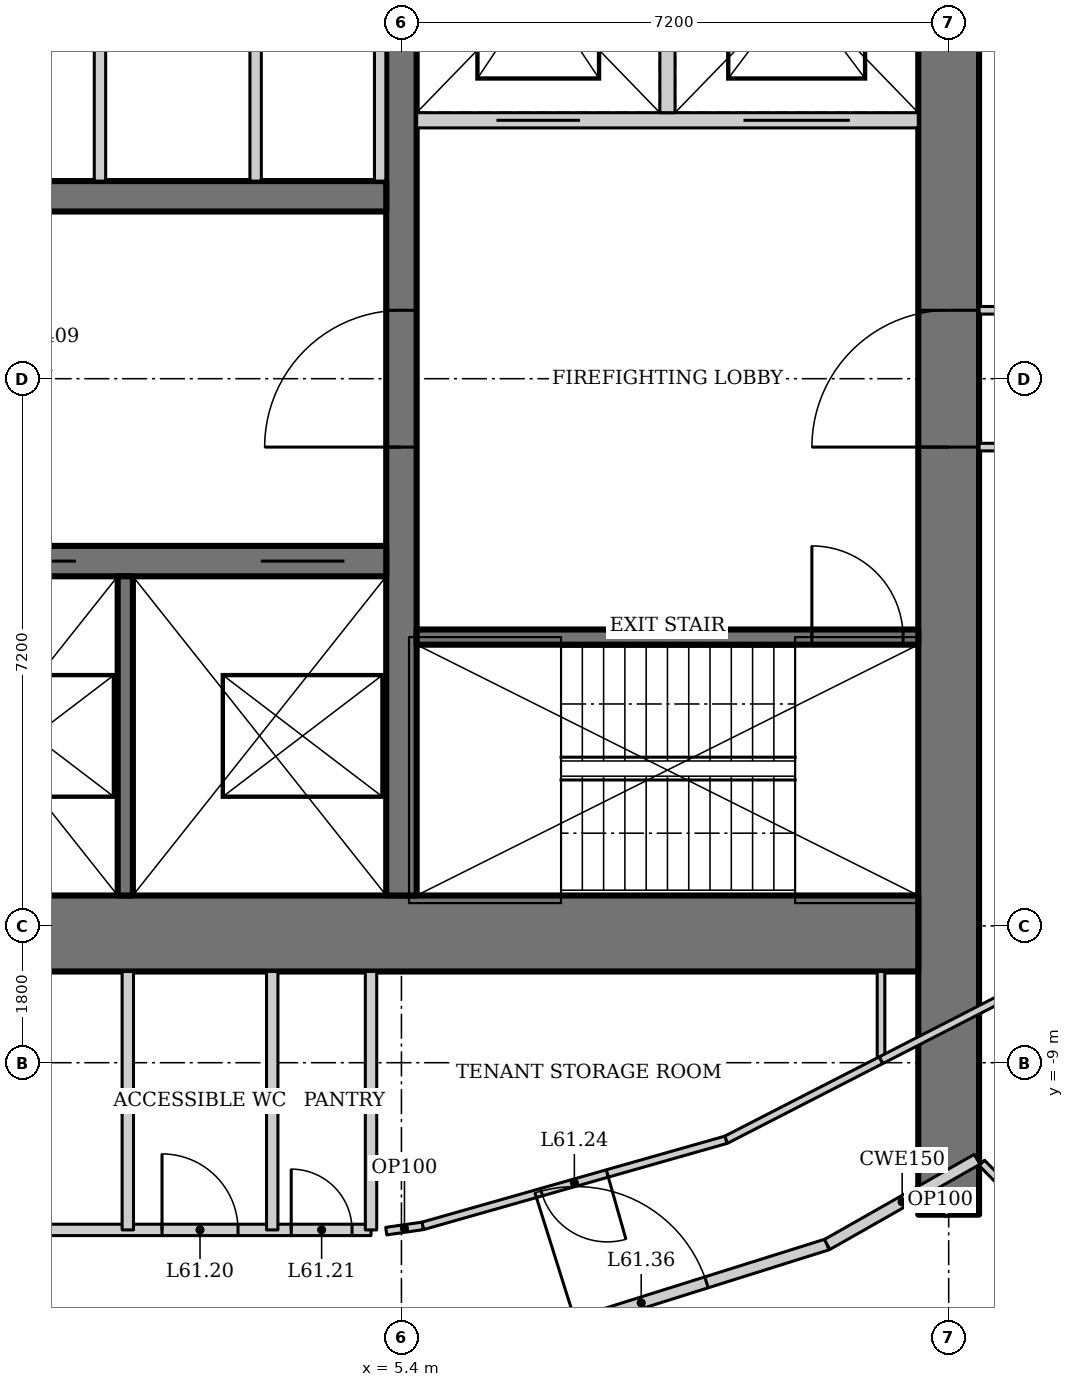
"""IFC4 building model, lengths in metres.
Left out: names, types, materials, properties, quantities, classifications, styles, units other than length and angle.
Written with IfcOpenShell. Run it as: python <this file> out.ifc"""

import sys

from ifc_helpers import new_model, si_unit, direction, frame, frame_2d, origin, place, context, subcontext, project, spatial, rectangle, extrude, element, fill, save


model = new_model("IFC4")
c1 = context("Model", 3, precision=1e-05, world=origin(), true_north=direction((0.0, 1.0)))
c2 = subcontext(c1, "Body", "Model", "MODEL_VIEW")
j1 = project(units=[si_unit("LENGTHUNIT", "METRE"), si_unit("PLANEANGLEUNIT", "RADIAN")], contexts=[c1])
p1 = place(None, origin())
s1 = spatial("IfcSite", under=j1, at=p1, CompositionType="ELEMENT")
p2 = place(p1, origin())
s2 = spatial("IfcBuilding", under=s1, at=p2, CompositionType="ELEMENT")
p3 = place(p2, frame((0.0, 0.0, 262.0)))
s3 = spatial("IfcBuildingStorey", under=s2, at=p3, CompositionType="ELEMENT", Elevation=262.0)
p4 = place(p3, frame((12.6, -11.0, 0.0), z_axis=(0.0, 0.0, 1.0), x_axis=(0.0, 1.0, 0.0)))
e1 = element("IfcWall", 1, at=p4, inside=s3, PredefinedType="SHEAR", context=c2, shape_type="SweptSolid", body=[
    extrude(rectangle(XDim=22.0, YDim=0.8, at=frame_2d((11.0, 0.0))), origin(), (0.0, 0.0, 1.0), 4.2),
])
p5 = place(p4, frame((10.1, 0.0, 0.0)))
e2 = element("IfcOpeningElement", 2, at=p5, cuts=e1, PredefinedType="OPENING", context=c2, shape_type="SweptSolid", body=[
    extrude(rectangle(XDim=1.8, YDim=2.1, at=frame_2d((0.9, 1.05))), frame((0.0, 0.41, 0.0), z_axis=(0.0, -1.0, 0.0), x_axis=(1.0, 0.0, 0.0)), (0.0, 0.0, 1.0), 0.82),
])
p6 = place(p3, frame((-12.2, -7.3, 0.0), z_axis=(0.0, 0.0, 1.0), x_axis=(1.0, 0.0, 0.0)))
e3 = element("IfcWall", 3, at=p6, inside=s3, PredefinedType="SHEAR", context=c2, shape_type="SweptSolid", body=[
    extrude(rectangle(XDim=24.4, YDim=1.0, at=frame_2d((12.2, 0.0))), origin(), (0.0, 0.0, 1.0), 4.2),
])
p7 = place(p3, frame((5.4, -6.8, 0.0), z_axis=(0.0, 0.0, 1.0), x_axis=(0.0, 1.0, 0.0)))
e4 = element("IfcWall", 4, at=p7, inside=s3, PredefinedType="SHEAR", context=c2, shape_type="SweptSolid", body=[
    extrude(rectangle(XDim=14.6, YDim=0.4, at=frame_2d((7.3, 0.0))), origin(), (0.0, 0.0, 1.0), 4.2),
])
p8 = place(p7, frame((5.9, 0.0, 0.0)))
e5 = element("IfcOpeningElement", 5, at=p8, cuts=e4, PredefinedType="OPENING", context=c2, shape_type="SweptSolid", body=[
    extrude(rectangle(XDim=1.8, YDim=2.1, at=frame_2d((0.9, 1.05))), frame((0.0, 0.21, 0.0), z_axis=(0.0, -1.0, 0.0), x_axis=(1.0, 0.0, 0.0)), (0.0, 0.0, 1.0), 0.42),
])
p9 = place(p3, frame((-5.2, -2.4, 0.0), z_axis=(0.0, 0.0, 1.0), x_axis=(1.0, 0.0, 0.0)))
e6 = element("IfcWall", 6, at=p9, inside=s3, PredefinedType="SHEAR", context=c2, shape_type="SweptSolid", body=[
    extrude(rectangle(XDim=10.4, YDim=0.4, at=frame_2d((5.2, 0.0))), origin(), (0.0, 0.0, 1.0), 4.2),
])
p10 = place(p9, frame((1.683, 0.0, 0.0)))
e7 = element("IfcOpeningElement", 7, at=p10, cuts=e6, PredefinedType="OPENING", context=c2, shape_type="SweptSolid", body=[
    extrude(rectangle(XDim=1.1, YDim=2.2, at=frame_2d((0.55, 1.1))), frame((0.0, 0.21, 0.0), z_axis=(0.0, -1.0, 0.0), x_axis=(1.0, 0.0, 0.0)), (0.0, 0.0, 1.0), 0.42),
])
p11 = place(p9, frame((5.217, 0.0, 0.0)))
e8 = element("IfcOpeningElement", 8, at=p11, cuts=e6, PredefinedType="OPENING", context=c2, shape_type="SweptSolid", body=[
    extrude(rectangle(XDim=1.1, YDim=2.2, at=frame_2d((0.55, 1.1))), frame((0.0, 0.21, 0.0), z_axis=(0.0, -1.0, 0.0), x_axis=(1.0, 0.0, 0.0)), (0.0, 0.0, 1.0), 0.42),
])
p12 = place(p9, frame((8.75, 0.0, 0.0)))
e9 = element("IfcOpeningElement", 9, at=p12, cuts=e6, PredefinedType="OPENING", context=c2, shape_type="SweptSolid", body=[
    extrude(rectangle(XDim=1.1, YDim=2.2, at=frame_2d((0.55, 1.1))), frame((0.0, 0.21, 0.0), z_axis=(0.0, -1.0, 0.0), x_axis=(1.0, 0.0, 0.0)), (0.0, 0.0, 1.0), 0.42),
])
p13 = place(p3, frame((1.767, -2.6, 0.0), z_axis=(0.0, 0.0, 1.0), x_axis=(0.0, -1.0, 0.0)))
e10 = element("IfcWall", 10, at=p13, inside=s3, PredefinedType="SOLIDWALL", context=c2, shape_type="SweptSolid", body=[
    extrude(rectangle(XDim=4.2, YDim=0.2, at=frame_2d((2.1, 0.0))), origin(), (0.0, 0.0, 1.0), 4.2),
])
p14 = place(p3, frame((5.2, 2.4, 0.0), z_axis=(0.0, 0.0, 1.0), x_axis=(-1.0, 0.0, 0.0)))
e11 = element("IfcWall", 11, at=p14, inside=s3, PredefinedType="SHEAR", context=c2, shape_type="SweptSolid", body=[
    extrude(rectangle(XDim=10.4, YDim=0.4, at=frame_2d((5.2, 0.0))), origin(), (0.0, 0.0, 1.0), 4.2),
])
p15 = place(p3, frame((5.6, -3.4, 0.0), z_axis=(0.0, 0.0, 1.0), x_axis=(1.0, 0.0, 0.0)))
e12 = element("IfcWall", 12, at=p15, inside=s3, PredefinedType="SHEAR", context=c2, shape_type="SweptSolid", body=[
    extrude(rectangle(XDim=6.6, YDim=0.2, at=frame_2d((3.3, 0.0))), origin(), (0.0, 0.0, 1.0), 4.2),
])
p16 = place(p15, frame((5.2, 0.0, 0.0)))
e13 = element("IfcOpeningElement", 13, at=p16, cuts=e12, PredefinedType="OPENING", context=c2, shape_type="SweptSolid", body=[
    extrude(rectangle(XDim=1.2, YDim=2.1, at=frame_2d((0.6, 1.05))), frame((0.0, 0.11, 0.0), z_axis=(0.0, -1.0, 0.0), x_axis=(1.0, 0.0, 0.0)), (0.0, 0.0, 1.0), 0.22),
])
p17 = place(p3, frame((12.2, 3.4, 0.0), z_axis=(0.0, 0.0, 1.0), x_axis=(-1.0, 0.0, 0.0)))
e14 = element("IfcWall", 14, at=p17, inside=s3, PredefinedType="SOLIDWALL", context=c2, shape_type="SweptSolid", body=[
    extrude(rectangle(XDim=6.6, YDim=0.2, at=frame_2d((3.3, 0.0))), origin(), (0.0, 0.0, 1.0), 4.2),
])
p18 = place(p17, frame((4.45, 0.0, 0.0)))
e15 = element("IfcOpeningElement", 15, at=p18, cuts=e14, PredefinedType="OPENING", context=c2, shape_type="SweptSolid", body=[
    extrude(rectangle(XDim=1.1, YDim=2.2, at=frame_2d((0.55, 1.1))), frame((0.0, 0.11, 0.0), z_axis=(0.0, -1.0, 0.0), x_axis=(1.0, 0.0, 0.0)), (0.0, 0.0, 1.0), 0.22),
])
p19 = place(p17, frame((0.9, 0.0, 0.0)))
e16 = element("IfcOpeningElement", 16, at=p19, cuts=e14, PredefinedType="OPENING", context=c2, shape_type="SweptSolid", body=[
    extrude(rectangle(XDim=1.4, YDim=2.2, at=frame_2d((0.7, 1.1))), frame((0.0, 0.11, 0.0), z_axis=(0.0, -1.0, 0.0), x_axis=(1.0, 0.0, 0.0)), (0.0, 0.0, 1.0), 0.22),
])
p20 = place(p3, frame((8.9, 3.5, 0.0), z_axis=(0.0, 0.0, 1.0), x_axis=(0.0, 1.0, 0.0)))
e17 = element("IfcWall", 17, at=p20, inside=s3, PredefinedType="SOLIDWALL", context=c2, shape_type="SweptSolid", body=[
    extrude(rectangle(XDim=3.3, YDim=0.2, at=frame_2d((1.65, 0.0))), origin(), (0.0, 0.0, 1.0), 4.2),
])
p21 = place(p3, frame((6.521, -12.799, 0.0), z_axis=(0.0, 0.0, 1.0), x_axis=(0.954031103669, 0.299707612903, 0.0)))
e18 = element("IfcWall", 18, at=p21, inside=s3, PredefinedType="PARTITIONING", context=c2, shape_type="SweptSolid", body=[
    extrude(rectangle(XDim=4.695, YDim=0.15, at=frame_2d((2.348, 0.0))), origin(), (0.0, 0.0, 1.0), 4.05),
])
p22 = place(p21, frame((1.231, 0.0, 0.0)))
e19 = element("IfcOpeningElement", 19, at=p22, cuts=e18, PredefinedType="OPENING", context=c2, shape_type="SweptSolid", body=[
    extrude(rectangle(XDim=1.8, YDim=2.1, at=frame_2d((0.9, 1.05))), frame((0.0, 0.085, 0.0), z_axis=(0.0, -1.0, 0.0), x_axis=(1.0, 0.0, 0.0)), (0.0, 0.0, 1.0), 0.17),
])
p23 = place(p3, frame((5.12, 2.6, 0.0), z_axis=(0.0, 0.0, 1.0), x_axis=(0.0, 1.0, 0.0)))
e20 = element("IfcWall", 20, at=p23, inside=s3, PredefinedType="SOLIDWALL", context=c2, shape_type="SweptSolid", body=[
    extrude(rectangle(XDim=4.4, YDim=0.15, at=frame_2d((2.2, 0.0))), origin(), (0.0, 0.0, 1.0), 4.05),
])
p24 = place(p3, frame((1.434, 2.6, 0.0), z_axis=(0.0, 0.0, 1.0), x_axis=(0.0, 1.0, 0.0)))
e21 = element("IfcWall", 21, at=p24, inside=s3, PredefinedType="SOLIDWALL", context=c2, shape_type="SweptSolid", body=[
    extrude(rectangle(XDim=4.4, YDim=0.15, at=frame_2d((2.2, 0.0))), origin(), (0.0, 0.0, 1.0), 3.108),
])
p25 = place(p3, frame((3.482, 2.6, 0.0), z_axis=(0.0, 0.0, 1.0), x_axis=(0.0, 1.0, 0.0)))
e22 = element("IfcWall", 22, at=p25, inside=s3, PredefinedType="SOLIDWALL", context=c2, shape_type="SweptSolid", body=[
    extrude(rectangle(XDim=4.4, YDim=0.15, at=frame_2d((2.2, 0.0))), origin(), (0.0, 0.0, 1.0), 4.05),
])
p26 = place(p3, frame((-5.0, -11.2, 0.0), z_axis=(0.0, 0.0, 1.0), x_axis=(1.0, 0.0, 0.0)))
e23 = element("IfcWall", 23, at=p26, inside=s3, PredefinedType="SOLIDWALL", context=c2, shape_type="SweptSolid", body=[
    extrude(rectangle(XDim=10.0, YDim=0.15, at=frame_2d((5.0, 0.0))), origin(), (0.0, 0.0, 1.0), 4.05),
])
p27 = place(p26, frame((1.25, 0.0, 0.0)))
e24 = element("IfcOpeningElement", 24, at=p27, cuts=e23, PredefinedType="OPENING", context=c2, shape_type="SweptSolid", body=[
    extrude(rectangle(XDim=0.9, YDim=2.1, at=frame_2d((0.45, 1.05))), frame((0.0, 0.085, 0.0), z_axis=(0.0, -1.0, 0.0), x_axis=(1.0, 0.0, 0.0)), (0.0, 0.0, 1.0), 0.17),
])
p28 = place(p26, frame((4.65, 0.0, 0.0)))
e25 = element("IfcOpeningElement", 25, at=p28, cuts=e23, PredefinedType="OPENING", context=c2, shape_type="SweptSolid", body=[
    extrude(rectangle(XDim=0.9, YDim=2.1, at=frame_2d((0.45, 1.05))), frame((0.0, 0.085, 0.0), z_axis=(0.0, -1.0, 0.0), x_axis=(1.0, 0.0, 0.0)), (0.0, 0.0, 1.0), 0.17),
])
p29 = place(p26, frame((7.25, 0.0, 0.0)))
e26 = element("IfcOpeningElement", 26, at=p29, cuts=e23, PredefinedType="OPENING", context=c2, shape_type="SweptSolid", body=[
    extrude(rectangle(XDim=1.0, YDim=2.1, at=frame_2d((0.5, 1.05))), frame((0.0, 0.085, 0.0), z_axis=(0.0, -1.0, 0.0), x_axis=(1.0, 0.0, 0.0)), (0.0, 0.0, 1.0), 0.17),
])
p30 = place(p26, frame((8.95, 0.0, 0.0)))
e27 = element("IfcOpeningElement", 27, at=p30, cuts=e23, PredefinedType="OPENING", context=c2, shape_type="SweptSolid", body=[
    extrude(rectangle(XDim=0.8, YDim=2.1, at=frame_2d((0.4, 1.05))), frame((0.0, 0.085, 0.0), z_axis=(0.0, -1.0, 0.0), x_axis=(1.0, 0.0, 0.0)), (0.0, 0.0, 1.0), 0.17),
])
p31 = place(p3, frame((5.0, -7.8, 0.0), z_axis=(0.0, 0.0, 1.0), x_axis=(0.0, -1.0, 0.0)))
e28 = element("IfcWall", 28, at=p31, inside=s3, PredefinedType="SOLIDWALL", context=c2, shape_type="SweptSolid", body=[
    extrude(rectangle(XDim=3.4, YDim=0.15, at=frame_2d((1.7, 0.0))), origin(), (0.0, 0.0, 1.0), 4.05),
])
p32 = place(p3, frame((1.8, -7.8, 0.0), z_axis=(0.0, 0.0, 1.0), x_axis=(0.0, -1.0, 0.0)))
e29 = element("IfcWall", 29, at=p32, inside=s3, PredefinedType="SOLIDWALL", context=c2, shape_type="SweptSolid", body=[
    extrude(rectangle(XDim=3.4, YDim=0.15, at=frame_2d((1.7, 0.0))), origin(), (0.0, 0.0, 1.0), 3.293),
])
p33 = place(p3, frame((3.7, -7.8, 0.0), z_axis=(0.0, 0.0, 1.0), x_axis=(0.0, -1.0, 0.0)))
e30 = element("IfcWall", 30, at=p33, inside=s3, PredefinedType="SOLIDWALL", context=c2, shape_type="SweptSolid", body=[
    extrude(rectangle(XDim=3.4, YDim=0.15, at=frame_2d((1.7, 0.0))), origin(), (0.0, 0.0, 1.0), 4.05),
])
p34 = place(p3, frame((11.71, -7.8, 0.0), z_axis=(0.0, 0.0, 1.0), x_axis=(0.0, -1.0, 0.0)))
e31 = element("IfcWall", 31, at=p34, inside=s3, PredefinedType="PARTITIONING", context=c2, shape_type="SweptSolid", body=[
    extrude(rectangle(XDim=1.167, YDim=0.1, at=frame_2d((0.583, 0.0))), origin(), (0.0, 0.0, 1.0), 4.05),
])
p35 = place(p3, frame((11.71, -8.967, 0.0), z_axis=(0.0, 0.0, 1.0), x_axis=(-0.889605609385, -0.456729525814, 0.0)))
e32 = element("IfcWall", 32, at=p35, inside=s3, PredefinedType="PARTITIONING", context=c2, shape_type="SweptSolid", body=[
    extrude(rectangle(XDim=2.293, YDim=0.1, at=frame_2d((1.146, 0.0))), origin(), (0.0, 0.0, 1.0), 4.05),
])
p36 = place(p3, frame((9.67, -10.014, 0.0), z_axis=(0.0, 0.0, 1.0), x_axis=(-0.961973498971, -0.273142796496, 0.0)))
e33 = element("IfcWall", 33, at=p36, inside=s3, PredefinedType="PARTITIONING", context=c2, shape_type="SweptSolid", body=[
    extrude(rectangle(XDim=4.148, YDim=0.1, at=frame_2d((2.074, 0.0))), origin(), (0.0, 0.0, 1.0), 4.05),
])
p37 = place(p36, frame((1.624, 0.0, 0.0)))
e34 = element("IfcOpeningElement", 34, at=p37, cuts=e33, PredefinedType="OPENING", context=c2, shape_type="SweptSolid", body=[
    extrude(rectangle(XDim=0.9, YDim=2.1, at=frame_2d((0.45, 1.05))), frame((0.0, 0.06, 0.0), z_axis=(0.0, -1.0, 0.0), x_axis=(1.0, 0.0, 0.0)), (0.0, 0.0, 1.0), 0.12),
])
p38 = place(p3, frame((5.68, -11.147, 0.0), z_axis=(0.0, 0.0, 1.0), x_axis=(-0.989797891768, -0.142478536811, 0.0)))
e35 = element("IfcWall", 35, at=p38, inside=s3, PredefinedType="PARTITIONING", context=c2, shape_type="SweptSolid", body=[
    extrude(rectangle(XDim=0.485, YDim=0.1, at=frame_2d((0.242, 0.0))), origin(), (0.0, 0.0, 1.0), 4.05),
])
p39 = place(p3, frame((12.6, -11.0, 0.0), z_axis=(0.0, 0.0, 1.0), x_axis=(-0.493794495037, 0.869578631678, 0.0)))
e36 = element("IfcWall", 36, at=p39, inside=s3, PredefinedType="PARTITIONING", context=c2, shape_type="SweptSolid", body=[
    extrude(rectangle(XDim=0.449, YDim=0.1, at=frame_2d((0.225, 0.0))), origin(), (0.0, 0.0, 1.0), 4.05),
])
p40 = place(p3, frame((11.001, -11.392, 0.0), z_axis=(0.0, 0.0, 1.0), x_axis=(0.869722107117, 0.493541747366, 0.0)))
e37 = element("IfcWall", 37, at=p40, inside=s3, PredefinedType="PARTITIONING", context=c2, shape_type="SweptSolid", body=[
    extrude(rectangle(XDim=2.27, YDim=0.15, at=frame_2d((1.135, 0.0))), origin(), (0.0, 0.0, 1.0), 4.05),
])
p41 = place(p3, frame((13.415, -8.092, 0.0), z_axis=(0.0, 0.0, 1.0), x_axis=(-0.889638356137, -0.456665736935, 0.0)))
e38 = element("IfcWall", 38, at=p41, inside=s3, PredefinedType="PARTITIONING", context=c2, shape_type="SweptSolid", body=[
    extrude(rectangle(XDim=1.917, YDim=0.1, at=frame_2d((0.958, 0.0))), origin(), (0.0, 0.0, 1.0), 4.05),
])
p42 = place(p3, frame((14.025, -11.325, 0.0), z_axis=(0.0, 0.0, 1.0), x_axis=(-0.701113567316, 0.713049623606, 0.0)))
e39 = element("IfcWall", 39, at=p42, inside=s3, PredefinedType="PARTITIONING", context=c2, shape_type="SweptSolid", body=[
    extrude(rectangle(XDim=1.411, YDim=0.1, at=frame_2d((0.706, 0.0))), origin(), (0.0, 0.0, 1.0), 4.05),
])
p43 = place(p3, frame((13.0, -0.9, 0.0), z_axis=(0.0, 0.0, 1.0), x_axis=(1.0, 0.0, 0.0)))
e40 = element("IfcWall", 40, at=p43, inside=s3, PredefinedType="PARTITIONING", context=c2, shape_type="SweptSolid", body=[
    extrude(rectangle(XDim=2.165, YDim=0.1, at=frame_2d((1.083, 0.0))), origin(), (0.0, 0.0, 1.0), 4.05),
])
p44 = place(p43, frame((1.15, 0.0, 0.0)))
e41 = element("IfcOpeningElement", 41, at=p44, cuts=e40, PredefinedType="OPENING", context=c2, shape_type="SweptSolid", body=[
    extrude(rectangle(XDim=0.9, YDim=2.1, at=frame_2d((0.45, 1.05))), frame((0.0, 0.06, 0.0), z_axis=(0.0, -1.0, 0.0), x_axis=(1.0, 0.0, 0.0)), (0.0, 0.0, 1.0), 0.12),
])
p45 = place(p3, frame((15.165, 0.9, 0.0), z_axis=(0.0, 0.0, 1.0), x_axis=(-1.0, 0.0, 0.0)))
e42 = element("IfcWall", 42, at=p45, inside=s3, PredefinedType="PARTITIONING", context=c2, shape_type="SweptSolid", body=[
    extrude(rectangle(XDim=2.165, YDim=0.1, at=frame_2d((1.083, 0.0))), origin(), (0.0, 0.0, 1.0), 4.05),
])
p46 = place(p45, frame((0.1, 0.0, 0.0)))
e43 = element("IfcOpeningElement", 43, at=p46, cuts=e42, PredefinedType="OPENING", context=c2, shape_type="SweptSolid", body=[
    extrude(rectangle(XDim=0.9, YDim=2.1, at=frame_2d((0.45, 1.05))), frame((0.0, 0.06, 0.0), z_axis=(0.0, -1.0, 0.0), x_axis=(1.0, 0.0, 0.0)), (0.0, 0.0, 1.0), 0.12),
])
p47 = place(p8, origin())
e44 = element("IfcDoor", 44, at=p47, inside=s3, OperationType="DOUBLE_DOOR_DOUBLE_SWING", PredefinedType="DOOR", context=c2, shape_type="SweptSolid", body=[
    extrude(rectangle(XDim=1.8, YDim=2.1, at=frame_2d((0.9, 1.05))), frame((0.0, 0.025, 0.0), z_axis=(0.0, -1.0, 0.0), x_axis=(1.0, 0.0, 0.0)), (0.0, 0.0, 1.0), 0.05),
])
fill(e5, e44)
p48 = place(p16, origin())
e45 = element("IfcDoor", 45, at=p48, inside=s3, OperationType="SINGLE_SWING_RIGHT", PredefinedType="DOOR", context=c2, shape_type="SweptSolid", body=[
    extrude(rectangle(XDim=1.2, YDim=2.1, at=frame_2d((0.6, 1.05))), frame((0.0, 0.025, 0.0), z_axis=(0.0, -1.0, 0.0), x_axis=(1.0, 0.0, 0.0)), (0.0, 0.0, 1.0), 0.05),
])
fill(e13, e45)
p49 = place(p5, origin())
e46 = element("IfcDoor", 46, at=p49, inside=s3, OperationType="DOUBLE_DOOR_DOUBLE_SWING", PredefinedType="DOOR", context=c2, shape_type="SweptSolid", body=[
    extrude(rectangle(XDim=1.8, YDim=2.1, at=frame_2d((0.9, 1.05))), frame((0.0, 0.025, 0.0), z_axis=(0.0, -1.0, 0.0), x_axis=(1.0, 0.0, 0.0)), (0.0, 0.0, 1.0), 0.05),
])
fill(e2, e46)
p50 = place(p11, origin())
e47 = element("IfcDoor", 47, at=p50, inside=s3, OperationType="DOUBLE_DOOR_SLIDING", PredefinedType="DOOR", context=c2, shape_type="SweptSolid", body=[
    extrude(rectangle(XDim=1.1, YDim=2.2, at=frame_2d((0.55, 1.1))), frame((0.0, 0.025, 0.0), z_axis=(0.0, -1.0, 0.0), x_axis=(1.0, 0.0, 0.0)), (0.0, 0.0, 1.0), 0.05),
])
fill(e8, e47)
p51 = place(p12, origin())
e48 = element("IfcDoor", 48, at=p51, inside=s3, OperationType="DOUBLE_DOOR_SLIDING", PredefinedType="DOOR", context=c2, shape_type="SweptSolid", body=[
    extrude(rectangle(XDim=1.1, YDim=2.2, at=frame_2d((0.55, 1.1))), frame((0.0, 0.025, 0.0), z_axis=(0.0, -1.0, 0.0), x_axis=(1.0, 0.0, 0.0)), (0.0, 0.0, 1.0), 0.05),
])
fill(e9, e48)
p52 = place(p18, origin())
e49 = element("IfcDoor", 49, at=p52, inside=s3, OperationType="DOUBLE_DOOR_SLIDING", PredefinedType="DOOR", context=c2, shape_type="SweptSolid", body=[
    extrude(rectangle(XDim=1.1, YDim=2.2, at=frame_2d((0.55, 1.1))), frame((0.0, 0.025, 0.0), z_axis=(0.0, -1.0, 0.0), x_axis=(1.0, 0.0, 0.0)), (0.0, 0.0, 1.0), 0.05),
])
fill(e15, e49)
p53 = place(p19, origin())
e50 = element("IfcDoor", 50, at=p53, inside=s3, OperationType="DOUBLE_DOOR_SLIDING", PredefinedType="DOOR", context=c2, shape_type="SweptSolid", body=[
    extrude(rectangle(XDim=1.4, YDim=2.2, at=frame_2d((0.7, 1.1))), frame((0.0, 0.025, 0.0), z_axis=(0.0, -1.0, 0.0), x_axis=(1.0, 0.0, 0.0)), (0.0, 0.0, 1.0), 0.05),
])
fill(e16, e50)
p54 = place(p29, origin())
e51 = element("IfcDoor", 51, at=p54, inside=s3, OperationType="SINGLE_SWING_LEFT", PredefinedType="DOOR", context=c2, shape_type="SweptSolid", body=[
    extrude(rectangle(XDim=1.0, YDim=2.1, at=frame_2d((0.5, 1.05))), frame((0.0, 0.025, 0.0), z_axis=(0.0, -1.0, 0.0), x_axis=(1.0, 0.0, 0.0)), (0.0, 0.0, 1.0), 0.05),
])
fill(e26, e51)
p55 = place(p30, origin())
e52 = element("IfcDoor", 52, at=p55, inside=s3, OperationType="SINGLE_SWING_LEFT", PredefinedType="DOOR", context=c2, shape_type="SweptSolid", body=[
    extrude(rectangle(XDim=0.8, YDim=2.1, at=frame_2d((0.4, 1.05))), frame((0.0, 0.025, 0.0), z_axis=(0.0, -1.0, 0.0), x_axis=(1.0, 0.0, 0.0)), (0.0, 0.0, 1.0), 0.05),
])
fill(e27, e52)
p56 = place(p37, origin())
e53 = element("IfcDoor", 53, at=p56, inside=s3, OperationType="SINGLE_SWING_LEFT", PredefinedType="DOOR", context=c2, shape_type="SweptSolid", body=[
    extrude(rectangle(XDim=0.9, YDim=2.1, at=frame_2d((0.45, 1.05))), frame((0.0, 0.025, 0.0), z_axis=(0.0, -1.0, 0.0), x_axis=(1.0, 0.0, 0.0)), (0.0, 0.0, 1.0), 0.05),
])
fill(e34, e53)
p57 = place(p22, origin())
e54 = element("IfcDoor", 54, at=p57, inside=s3, OperationType="DOUBLE_DOOR_DOUBLE_SWING", PredefinedType="DOOR", context=c2, shape_type="SweptSolid", body=[
    extrude(rectangle(XDim=1.8, YDim=2.1, at=frame_2d((0.9, 1.05))), frame((0.0, 0.025, 0.0), z_axis=(0.0, -1.0, 0.0), x_axis=(1.0, 0.0, 0.0)), (0.0, 0.0, 1.0), 0.05),
])
fill(e19, e54)
save(model, sys.argv[1])
